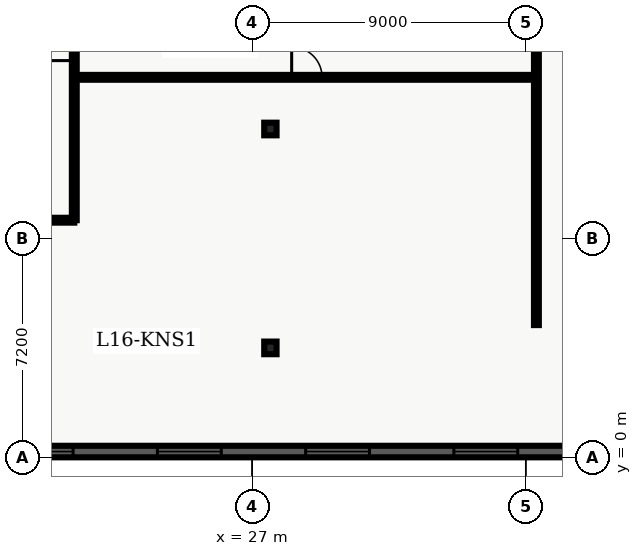
"""IFC4 building model, lengths in metres.
Left out: names, types, materials, properties, quantities, classifications, styles, units other than length and angle.
Written with IfcOpenShell. Run it as: python <this file> out.ifc"""

import sys

from ifc_helpers import new_model, entity, si_unit, converted_unit, direction, frame, origin_with_axes, origin_2d_with_axis, place, context, subcontext, project, spatial, polyline, rectangle, i_section, outline, extrude, element, fill, save


model = new_model("IFC4")
c1 = context("Model", 3, precision=1e-05, world=origin_with_axes(), true_north=direction((0.0, 1.0)))
c2 = subcontext(c1, "Body", "Model", "MODEL_VIEW")
j1 = project(units=[si_unit("LENGTHUNIT", "METRE"), converted_unit("PLANEANGLEUNIT", "DEGREE", entity("IfcPlaneAngleMeasure", 0.017), si_unit("PLANEANGLEUNIT", "RADIAN"), dimensions=[0, 0, 0, 0, 0, 0, 0])], contexts=[c1])
p1 = place(None, origin_with_axes())
s1 = spatial("IfcSite", under=j1, at=p1, CompositionType="ELEMENT")
p2 = place(p1, origin_with_axes())
s2 = spatial("IfcBuilding", under=s1, at=p2, CompositionType="ELEMENT")
p3 = place(p2, frame((0.0, 0.0, 67.8), z_axis=(0.0, 0.0, 1.0), x_axis=(1.0, 0.0, 0.0)))
s3 = spatial("IfcBuildingStorey", under=s2, at=p3, CompositionType="ELEMENT", Elevation=67.8)
for number, where, z_axis, x_axis in (
    (1, (27.6, 3.6, 0.0), (0.0, 0.0, 1.0), (1.0, 0.0, 0.0)),
    (2, (27.6, 10.8, 0.0), (0.0, 0.0, 1.0), (1.0, 0.0, 0.0)),
):
    element("IfcColumn", number, at=place(p3, frame(where, z_axis=z_axis, x_axis=x_axis)), inside=s3, PredefinedType="COLUMN", context=c2, shape_type="SweptSolid", body=[
        extrude(i_section(OverallWidth=0.406, OverallDepth=0.416, WebThickness=0.03, FlangeThickness=0.048, FilletRadius=0.022, at=origin_2d_with_axis()), origin_with_axes(), (0.0, 0.0, 1.0), 3.9),
    ])
p4 = place(p3, frame((2.6, 7.8, 0.0), z_axis=(0.0, 0.0, 1.0), x_axis=(1.0, 0.0, 0.0)))
e3 = element("IfcWall", 3, at=p4, inside=s3, PredefinedType="PARTITIONING", context=c2, shape_type="SweptSolid", body=[
    extrude(outline(polyline([(0.0, -0.08), (18.55, -0.08), (18.55, 0.08), (0.0, 0.08), (0.0, -0.08)])), origin_with_axes(), (0.0, 0.0, 1.0), 2.7),
])
p5 = place(p4, frame((2.149, 0.0, 0.0), z_axis=(0.0, 0.0, 1.0), x_axis=(1.0, 0.0, 0.0)))
e4 = element("IfcOpeningElement", 4, at=p5, cuts=e3, PredefinedType="OPENING", context=c2, shape_type="SweptSolid", body=[
    extrude(rectangle(XDim=1.0, YDim=0.18, at=origin_2d_with_axis()), origin_with_axes(), (0.0, 0.0, 1.0), 2.15),
])
p6 = place(p4, frame((6.554, 0.0, 0.0), z_axis=(0.0, 0.0, 1.0), x_axis=(1.0, 0.0, 0.0)))
e5 = element("IfcOpeningElement", 5, at=p6, cuts=e3, PredefinedType="OPENING", context=c2, shape_type="SweptSolid", body=[
    extrude(rectangle(XDim=1.0, YDim=0.18, at=origin_2d_with_axis()), origin_with_axes(), (0.0, 0.0, 1.0), 2.15),
])
p7 = place(p4, frame((11.937, 0.0, 0.0), z_axis=(0.0, 0.0, 1.0), x_axis=(1.0, 0.0, 0.0)))
e6 = element("IfcOpeningElement", 6, at=p7, cuts=e3, PredefinedType="OPENING", context=c2, shape_type="SweptSolid", body=[
    extrude(rectangle(XDim=1.0, YDim=0.18, at=origin_2d_with_axis()), origin_with_axes(), (0.0, 0.0, 1.0), 2.15),
])
p8 = place(p4, frame((16.507, 0.0, 0.0), z_axis=(0.0, 0.0, 1.0), x_axis=(1.0, 0.0, 0.0)))
e7 = element("IfcOpeningElement", 7, at=p8, cuts=e3, PredefinedType="OPENING", context=c2, shape_type="SweptSolid", body=[
    extrude(rectangle(XDim=1.0, YDim=0.18, at=origin_2d_with_axis()), origin_with_axes(), (0.0, 0.0, 1.0), 2.15),
])
p9 = place(p3, frame((21.15, 7.8, 0.0), z_axis=(0.0, 0.0, 1.0), x_axis=(0.0, 1.0, 0.0)))
e8 = element("IfcWall", 8, at=p9, inside=s3, PredefinedType="PARTITIONING", context=c2, shape_type="SweptSolid", body=[
    extrude(outline(polyline([(0.0, -0.08), (32.7, -0.08), (32.7, 0.08), (0.0, 0.08), (0.0, -0.08)])), origin_with_axes(), (0.0, 0.0, 1.0), 2.7),
])
p10 = place(p9, frame((5.775, 0.0, 0.0), z_axis=(0.0, 0.0, 1.0), x_axis=(1.0, 0.0, 0.0)))
e9 = element("IfcOpeningElement", 9, at=p10, cuts=e8, PredefinedType="OPENING", context=c2, shape_type="SweptSolid", body=[
    extrude(rectangle(XDim=1.05, YDim=0.18, at=origin_2d_with_axis()), origin_with_axes(), (0.0, 0.0, 1.0), 2.15),
])
p11 = place(p3, frame((21.15, 12.5, 0.0), z_axis=(0.0, 0.0, 1.0), x_axis=(1.0, 0.0, 0.0)))
e10 = element("IfcWall", 10, at=p11, inside=s3, PredefinedType="PARTITIONING", context=c2, shape_type="SweptSolid", body=[
    extrude(outline(polyline([(0.0, -0.08), (15.2, -0.08), (15.2, 0.08), (0.0, 0.08), (0.0, -0.08)])), origin_with_axes(), (0.0, 0.0, 1.0), 2.7),
])
p12 = place(p11, frame((7.65, 0.0, 0.0), z_axis=(0.0, 0.0, 1.0), x_axis=(1.0, 0.0, 0.0)))
e11 = element("IfcOpeningElement", 11, at=p12, cuts=e10, PredefinedType="OPENING", context=c2, shape_type="SweptSolid", body=[
    extrude(rectangle(XDim=1.0, YDim=0.18, at=origin_2d_with_axis()), origin_with_axes(), (0.0, 0.0, 1.0), 2.15),
])
p13 = place(p3, frame((36.35, 4.35, 0.0), z_axis=(0.0, 0.0, 1.0), x_axis=(0.0, 1.0, 0.0)))
e12 = element("IfcWall", 12, at=p13, inside=s3, PredefinedType="PARTITIONING", context=c2, shape_type="SweptSolid", body=[
    extrude(outline(polyline([(0.0, -0.08), (16.95, -0.08), (16.95, 0.08), (0.0, 0.08), (0.0, -0.08)])), origin_with_axes(), (0.0, 0.0, 1.0), 2.7),
])
p14 = place(p3, frame((57.22, 0.19, 0.0), z_axis=(0.0, 0.0, 1.0), x_axis=(-1.0, 0.0, 0.0)))
e13 = element("IfcWall", 13, at=p14, inside=s3, PredefinedType="SOLIDWALL", context=c2, shape_type="SweptSolid", body=[
    extrude(outline(polyline([(0.0, -0.19), (54.82, -0.19), (54.82, 0.19), (0.0, 0.19), (0.0, -0.19)])), origin_with_axes(), (0.0, 0.0, 1.0), 3.66),
])
p15 = place(p14, frame((3.037, 0.0, 0.45), z_axis=(0.0, 0.0, 1.0), x_axis=(1.0, 0.0, 0.0)))
e14 = element("IfcOpeningElement", 14, at=p15, cuts=e13, PredefinedType="OPENING", context=c2, shape_type="SweptSolid", body=[
    extrude(rectangle(XDim=2.1, YDim=0.4, at=origin_2d_with_axis()), origin_with_axes(), (0.0, 0.0, 1.0), 2.2),
])
p16 = place(p14, frame((7.912, 0.0, 0.45), z_axis=(0.0, 0.0, 1.0), x_axis=(1.0, 0.0, 0.0)))
e15 = element("IfcOpeningElement", 15, at=p16, cuts=e13, PredefinedType="OPENING", context=c2, shape_type="SweptSolid", body=[
    extrude(rectangle(XDim=2.1, YDim=0.4, at=origin_2d_with_axis()), origin_with_axes(), (0.0, 0.0, 1.0), 2.2),
])
p17 = place(p14, frame((12.786, 0.0, 0.45), z_axis=(0.0, 0.0, 1.0), x_axis=(1.0, 0.0, 0.0)))
e16 = element("IfcOpeningElement", 16, at=p17, cuts=e13, PredefinedType="OPENING", context=c2, shape_type="SweptSolid", body=[
    extrude(rectangle(XDim=2.1, YDim=0.4, at=origin_2d_with_axis()), origin_with_axes(), (0.0, 0.0, 1.0), 2.2),
])
p18 = place(p14, frame((17.661, 0.0, 0.45), z_axis=(0.0, 0.0, 1.0), x_axis=(1.0, 0.0, 0.0)))
e17 = element("IfcOpeningElement", 17, at=p18, cuts=e13, PredefinedType="OPENING", context=c2, shape_type="SweptSolid", body=[
    extrude(rectangle(XDim=2.1, YDim=0.4, at=origin_2d_with_axis()), origin_with_axes(), (0.0, 0.0, 1.0), 2.2),
])
p19 = place(p14, frame((22.535, 0.0, 0.45), z_axis=(0.0, 0.0, 1.0), x_axis=(1.0, 0.0, 0.0)))
e18 = element("IfcOpeningElement", 18, at=p19, cuts=e13, PredefinedType="OPENING", context=c2, shape_type="SweptSolid", body=[
    extrude(rectangle(XDim=2.1, YDim=0.4, at=origin_2d_with_axis()), origin_with_axes(), (0.0, 0.0, 1.0), 2.2),
])
p20 = place(p14, frame((27.41, 0.0, 0.45), z_axis=(0.0, 0.0, 1.0), x_axis=(1.0, 0.0, 0.0)))
e19 = element("IfcOpeningElement", 19, at=p20, cuts=e13, PredefinedType="OPENING", context=c2, shape_type="SweptSolid", body=[
    extrude(rectangle(XDim=2.1, YDim=0.4, at=origin_2d_with_axis()), origin_with_axes(), (0.0, 0.0, 1.0), 2.2),
])
p21 = place(p14, frame((32.285, 0.0, 0.45), z_axis=(0.0, 0.0, 1.0), x_axis=(1.0, 0.0, 0.0)))
e20 = element("IfcOpeningElement", 20, at=p21, cuts=e13, PredefinedType="OPENING", context=c2, shape_type="SweptSolid", body=[
    extrude(rectangle(XDim=2.1, YDim=0.4, at=origin_2d_with_axis()), origin_with_axes(), (0.0, 0.0, 1.0), 2.2),
])
p22 = place(p14, frame((37.159, 0.0, 0.45), z_axis=(0.0, 0.0, 1.0), x_axis=(1.0, 0.0, 0.0)))
e21 = element("IfcOpeningElement", 21, at=p22, cuts=e13, PredefinedType="OPENING", context=c2, shape_type="SweptSolid", body=[
    extrude(rectangle(XDim=2.1, YDim=0.4, at=origin_2d_with_axis()), origin_with_axes(), (0.0, 0.0, 1.0), 2.2),
])
p23 = place(p14, frame((42.034, 0.0, 0.45), z_axis=(0.0, 0.0, 1.0), x_axis=(1.0, 0.0, 0.0)))
e22 = element("IfcOpeningElement", 22, at=p23, cuts=e13, PredefinedType="OPENING", context=c2, shape_type="SweptSolid", body=[
    extrude(rectangle(XDim=2.1, YDim=0.4, at=origin_2d_with_axis()), origin_with_axes(), (0.0, 0.0, 1.0), 2.2),
])
p24 = place(p14, frame((47.758, 0.0, 0.45), z_axis=(0.0, 0.0, 1.0), x_axis=(1.0, 0.0, 0.0)))
e23 = element("IfcOpeningElement", 23, at=p24, cuts=e13, PredefinedType="OPENING", context=c2, shape_type="SweptSolid", body=[
    extrude(rectangle(XDim=2.1, YDim=0.4, at=origin_2d_with_axis()), origin_with_axes(), (0.0, 0.0, 1.0), 2.2),
])
p25 = place(p14, frame((52.233, 0.0, 0.45), z_axis=(0.0, 0.0, 1.0), x_axis=(1.0, 0.0, 0.0)))
e24 = element("IfcOpeningElement", 24, at=p25, cuts=e13, PredefinedType="OPENING", context=c2, shape_type="SweptSolid", body=[
    extrude(rectangle(XDim=2.1, YDim=0.4, at=origin_2d_with_axis()), origin_with_axes(), (0.0, 0.0, 1.0), 2.2),
])
p26 = place(p9, frame((5.775, 0.0, 0.0), z_axis=(0.0, 0.0, 1.0), x_axis=(1.0, 0.0, 0.0)))
e25 = element("IfcDoor", 25, at=p26, inside=s3, OperationType="SINGLE_SWING_LEFT", PredefinedType="DOOR", context=c2, shape_type="SweptSolid", body=[
    extrude(rectangle(XDim=1.05, YDim=0.09, at=origin_2d_with_axis()), origin_with_axes(), (0.0, 0.0, 1.0), 2.15),
])
fill(e9, e25)
p27 = place(p11, frame((7.65, 0.0, 0.0), z_axis=(0.0, 0.0, 1.0), x_axis=(1.0, 0.0, 0.0)))
e26 = element("IfcDoor", 26, at=p27, inside=s3, OperationType="SINGLE_SWING_LEFT", PredefinedType="DOOR", context=c2, shape_type="SweptSolid", body=[
    extrude(rectangle(XDim=1.0, YDim=0.09, at=origin_2d_with_axis()), origin_with_axes(), (0.0, 0.0, 1.0), 2.15),
])
fill(e11, e26)
p28 = place(p14, frame((22.535, 0.0, 0.45), z_axis=(0.0, 0.0, 1.0), x_axis=(1.0, 0.0, 0.0)))
e27 = element("IfcWindow", 27, at=p28, inside=s3, PredefinedType="WINDOW", context=c2, shape_type="SweptSolid", body=[
    extrude(rectangle(XDim=2.1, YDim=0.09, at=origin_2d_with_axis()), origin_with_axes(), (0.0, 0.0, 1.0), 2.2),
])
fill(e18, e27)
p29 = place(p14, frame((27.41, 0.0, 0.45), z_axis=(0.0, 0.0, 1.0), x_axis=(1.0, 0.0, 0.0)))
e28 = element("IfcWindow", 28, at=p29, inside=s3, PredefinedType="WINDOW", context=c2, shape_type="SweptSolid", body=[
    extrude(rectangle(XDim=2.1, YDim=0.09, at=origin_2d_with_axis()), origin_with_axes(), (0.0, 0.0, 1.0), 2.2),
])
fill(e19, e28)
p30 = place(p14, frame((32.285, 0.0, 0.45), z_axis=(0.0, 0.0, 1.0), x_axis=(1.0, 0.0, 0.0)))
e29 = element("IfcWindow", 29, at=p30, inside=s3, PredefinedType="WINDOW", context=c2, shape_type="SweptSolid", body=[
    extrude(rectangle(XDim=2.1, YDim=0.09, at=origin_2d_with_axis()), origin_with_axes(), (0.0, 0.0, 1.0), 2.2),
])
fill(e20, e29)
p31 = place(p14, frame((37.159, 0.0, 0.45), z_axis=(0.0, 0.0, 1.0), x_axis=(1.0, 0.0, 0.0)))
e30 = element("IfcWindow", 30, at=p31, inside=s3, PredefinedType="WINDOW", context=c2, shape_type="SweptSolid", body=[
    extrude(rectangle(XDim=2.1, YDim=0.09, at=origin_2d_with_axis()), origin_with_axes(), (0.0, 0.0, 1.0), 2.2),
])
fill(e21, e30)
save(model, sys.argv[1])
